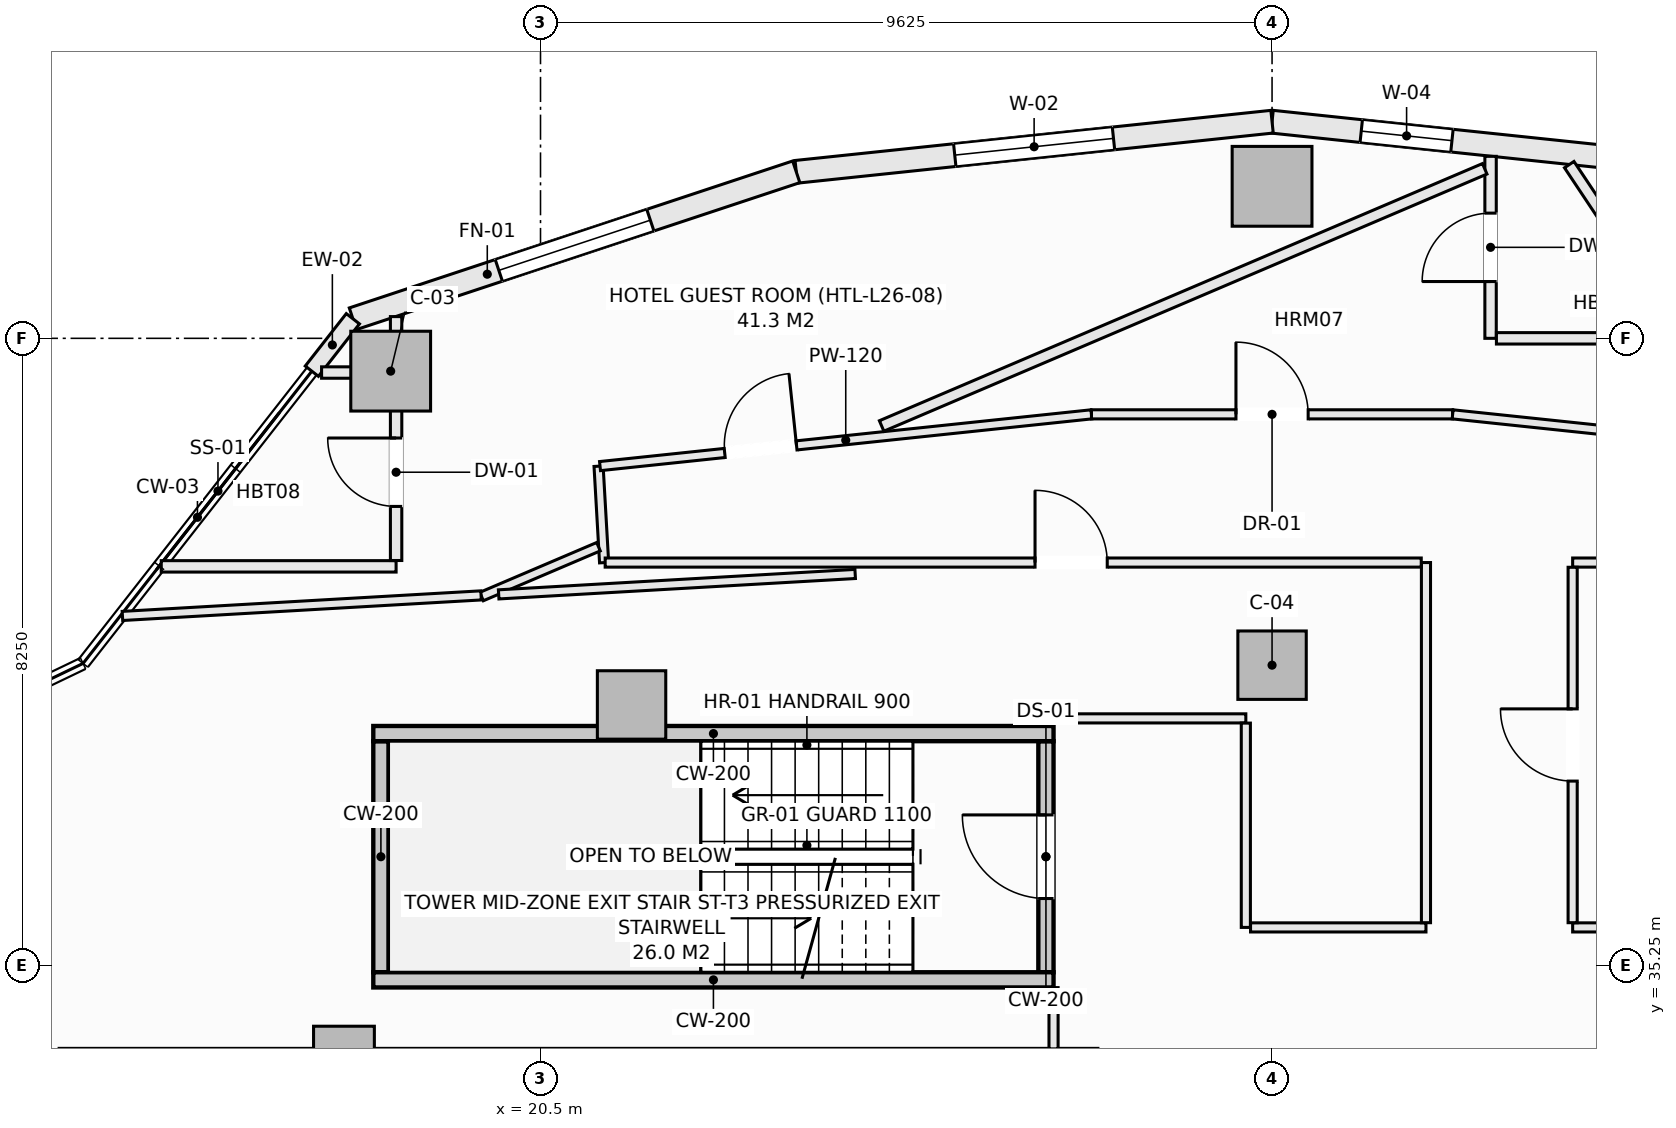
"""IFC4 building model, lengths in metres.
Left out: names, types, materials, properties, quantities, classifications, styles, units other than length and angle.
Written with IfcOpenShell. Run it as: python <this file> out.ifc"""

import sys

from ifc_helpers import new_model, si_unit, direction, frame, frame_2d, origin, origin_2d, place, context, subcontext, project, spatial, rectangle, extrude, element, fill, save


model = new_model("IFC4")
c1 = context("Model", 3, precision=1e-05, world=origin(), true_north=direction((0.0, 1.0)))
c2 = subcontext(c1, "Body", "Model", "MODEL_VIEW")
j1 = project(units=[si_unit("LENGTHUNIT", "METRE"), si_unit("PLANEANGLEUNIT", "RADIAN")], contexts=[c1])
p1 = place(None, origin())
s1 = spatial("IfcSite", under=j1, at=p1, CompositionType="ELEMENT")
p2 = place(p1, origin())
s2 = spatial("IfcBuilding", under=s1, at=p2, CompositionType="ELEMENT")
p3 = place(p2, frame((0.0, 0.0, 108.7)))
s3 = spatial("IfcBuildingStorey", under=s2, at=p3, CompositionType="ELEMENT", Elevation=108.7)
for number, where, z_axis, x_axis in (
    (1, (30.125, 45.5, -0.27), (0.0, 0.0, 1.0), (1.0, 0.0, 0.0)),
    (2, (18.529, 43.068, -0.27), (0.0, 0.0, 1.0), (1.0, 0.0, 0.0)),
):
    element("IfcColumn", number, at=place(p3, frame(where, z_axis=z_axis, x_axis=x_axis)), inside=s3, PredefinedType="COLUMN", context=c2, shape_type="SweptSolid", body=[
        extrude(rectangle(XDim=1.05, YDim=1.05, at=origin_2d()), origin(), (0.0, 0.0, 1.0), 3.4),
    ])
for number, where, z_axis, x_axis in (
    (3, (30.125, 39.2, -0.27), (0.0, 0.0, 1.0), (1.0, 0.0, 0.0)),
    (4, (21.698, 38.677, -0.27), (0.0, 0.0, 1.0), (1.0, 0.0, 0.0)),
):
    element("IfcColumn", number, at=place(p3, frame(where, z_axis=z_axis, x_axis=x_axis)), inside=s3, PredefinedType="COLUMN", context=c2, shape_type="SweptSolid", body=[
        extrude(rectangle(XDim=0.9, YDim=0.9, at=origin_2d()), origin(), (0.0, 0.0, 1.0), 3.4),
    ])
p4 = place(p3, frame((17.914, 34.05, -0.27), z_axis=(0.0, 0.0, 1.0), x_axis=(1.0, 0.0, 0.0)))
e5 = element("IfcColumn", 5, at=p4, inside=s3, PredefinedType="PILASTER", context=c2, shape_type="SweptSolid", body=[
    extrude(rectangle(XDim=0.8, YDim=0.8, at=origin_2d()), origin(), (0.0, 0.0, 1.0), 3.4),
])
p5 = place(p3, frame((30.125, 46.35, 0.0), z_axis=(0.0, 0.0, 1.0), x_axis=(0.994498012394, -0.104755445421, 0.0)))
e6 = element("IfcWall", 6, at=p5, inside=s3, PredefinedType="SOLIDWALL", context=c2, shape_type="SweptSolid", body=[
    extrude(rectangle(XDim=6.295, YDim=0.3, at=frame_2d((3.147, 0.0))), origin(), (0.0, 0.0, 1.0), 2.653),
])
p6 = place(p5, frame((1.18, 0.0, 0.72)))
e7 = element("IfcOpeningElement", 7, at=p6, cuts=e6, PredefinedType="OPENING", context=c2, shape_type="SweptSolid", body=[
    extrude(rectangle(XDim=1.2, YDim=1.65, at=frame_2d((0.6, 0.825))), frame((0.0, 0.16, 0.0), z_axis=(0.0, -1.0, 0.0), x_axis=(1.0, 0.0, 0.0)), (0.0, 0.0, 1.0), 0.32),
])
p7 = place(p3, frame((23.865, 45.691, 0.0), z_axis=(0.0, 0.0, 1.0), x_axis=(0.994498012394, 0.104755445421, 0.0)))
e8 = element("IfcWall", 8, at=p7, inside=s3, PredefinedType="SOLIDWALL", context=c2, shape_type="SweptSolid", body=[
    extrude(rectangle(XDim=6.295, YDim=0.3, at=frame_2d((3.147, 0.0))), origin(), (0.0, 0.0, 1.0), 2.653),
])
p8 = place(p7, frame((2.097, 0.0, 0.74)))
e9 = element("IfcOpeningElement", 9, at=p8, cuts=e8, PredefinedType="OPENING", context=c2, shape_type="SweptSolid", body=[
    extrude(rectangle(XDim=2.1, YDim=1.7, at=frame_2d((1.05, 0.85))), frame((0.0, 0.16, 0.0), z_axis=(0.0, -1.0, 0.0), x_axis=(1.0, 0.0, 0.0)), (0.0, 0.0, 1.0), 0.32),
])
p9 = place(p3, frame((18.031, 43.758, 0.0), z_axis=(0.0, 0.0, 1.0), x_axis=(0.949238009374, 0.314558741032, 0.0)))
e10 = element("IfcWall", 10, at=p9, inside=s3, PredefinedType="SOLIDWALL", context=c2, shape_type="SweptSolid", body=[
    extrude(rectangle(XDim=6.146, YDim=0.3, at=frame_2d((3.073, 0.0))), origin(), (0.0, 0.0, 1.0), 2.653),
])
p10 = place(p9, frame((2.023, 0.0, 0.74)))
e11 = element("IfcOpeningElement", 11, at=p10, cuts=e10, PredefinedType="OPENING", context=c2, shape_type="SweptSolid", body=[
    extrude(rectangle(XDim=2.1, YDim=1.7, at=frame_2d((1.05, 0.85))), frame((0.0, 0.16, 0.0), z_axis=(0.0, -1.0, 0.0), x_axis=(1.0, 0.0, 0.0)), (0.0, 0.0, 1.0), 0.32),
])
p11 = place(p3, frame((17.491, 43.068, 0.0), z_axis=(0.0, 0.0, 1.0), x_axis=(0.616330810297, 0.787487353726, 0.0)))
e12 = element("IfcWall", 12, at=p11, inside=s3, PredefinedType="SOLIDWALL", context=c2, shape_type="SweptSolid", body=[
    extrude(rectangle(XDim=0.876, YDim=0.22, at=frame_2d((0.438, 0.0))), origin(), (0.0, 0.0, 1.0), 2.653),
])
p12 = place(p3, frame((27.15, 35.16, -0.27), z_axis=(0.0, 0.0, 1.0), x_axis=(0.0, 1.0, 0.0)))
e13 = element("IfcWall", 13, at=p12, inside=s3, PredefinedType="SHEAR", context=c2, shape_type="SweptSolid", body=[
    extrude(rectangle(XDim=3.04, YDim=0.2, at=frame_2d((1.52, 0.0))), origin(), (0.0, 0.0, 1.0), 3.4),
])
p13 = place(p12, frame((0.97, 0.0, 0.27)))
e14 = element("IfcOpeningElement", 14, at=p13, cuts=e13, PredefinedType="OPENING", context=c2, shape_type="SweptSolid", body=[
    extrude(rectangle(XDim=1.1, YDim=2.15, at=frame_2d((0.55, 1.075))), frame((0.0, 0.11, 0.0), z_axis=(0.0, -1.0, 0.0), x_axis=(1.0, 0.0, 0.0)), (0.0, 0.0, 1.0), 0.22),
])
p14 = place(p3, frame((18.4, 35.16, -0.27), z_axis=(0.0, 0.0, 1.0), x_axis=(0.0, 1.0, 0.0)))
e15 = element("IfcWall", 15, at=p14, inside=s3, PredefinedType="SHEAR", context=c2, shape_type="SweptSolid", body=[
    extrude(rectangle(XDim=3.04, YDim=0.2, at=frame_2d((1.52, 0.0))), origin(), (0.0, 0.0, 1.0), 3.4),
])
for number, where, z_axis, x_axis in (
    (16, (18.3, 38.3, -0.27), (0.0, 0.0, 1.0), (1.0, 0.0, 0.0)),
    (17, (18.3, 35.06, -0.27), (0.0, 0.0, 1.0), (1.0, 0.0, 0.0)),
):
    element("IfcWall", number, at=place(p3, frame(where, z_axis=z_axis, x_axis=x_axis)), inside=s3, PredefinedType="SHEAR", context=c2, shape_type="SweptSolid", body=[
        extrude(rectangle(XDim=8.95, YDim=0.2, at=frame_2d((4.475, 0.0))), origin(), (0.0, 0.0, 1.0), 3.4),
    ])
p15 = place(p3, frame((21.264, 41.818, 0.0), z_axis=(0.0, 0.0, 1.0), x_axis=(0.0574492264, -0.99834842935, 0.0)))
e18 = element("IfcWall", 18, at=p15, inside=s3, PredefinedType="PARTITIONING", context=c2, shape_type="SweptSolid", body=[
    extrude(rectangle(XDim=1.271, YDim=0.12, at=frame_2d((0.635, 0.0))), origin(), (0.0, 0.0, 1.0), 3.13),
])
p16 = place(p3, frame((27.25, 34.152, 0.0), z_axis=(0.0, 0.0, 1.0), x_axis=(0.0, 1.0, 0.0)))
e19 = element("IfcWall", 19, at=p16, inside=s3, PredefinedType="PARTITIONING", context=c2, shape_type="SweptSolid", body=[
    extrude(rectangle(XDim=0.806, YDim=0.12, at=frame_2d((0.403, 0.0))), origin(), (0.0, 0.0, 1.0), 3.13),
])
p17 = place(p3, frame((27.25, 38.5, 0.0), z_axis=(0.0, 0.0, 1.0), x_axis=(1.0, 0.0, 0.0)))
e20 = element("IfcWall", 20, at=p17, inside=s3, PredefinedType="PARTITIONING", context=c2, shape_type="SweptSolid", body=[
    extrude(rectangle(XDim=2.53, YDim=0.12, at=frame_2d((1.265, 0.0))), origin(), (0.0, 0.0, 1.0), 3.13),
])
p18 = place(p3, frame((29.78, 35.75, 0.0), z_axis=(0.0, 0.0, 1.0), x_axis=(0.0, 1.0, 0.0)))
e21 = element("IfcWall", 21, at=p18, inside=s3, PredefinedType="PARTITIONING", context=c2, shape_type="SweptSolid", body=[
    extrude(rectangle(XDim=2.688, YDim=0.12, at=frame_2d((1.344, 0.0))), origin(), (0.0, 0.0, 1.0), 3.13),
])
p19 = place(p3, frame((29.842, 35.75, 0.0), z_axis=(0.0, 0.0, 1.0), x_axis=(1.0, 0.0, 0.0)))
e22 = element("IfcWall", 22, at=p19, inside=s3, PredefinedType="PARTITIONING", context=c2, shape_type="SweptSolid", body=[
    extrude(rectangle(XDim=2.308, YDim=0.12, at=frame_2d((1.154, 0.0))), origin(), (0.0, 0.0, 1.0), 3.13),
])
p20 = place(p3, frame((34.08, 35.75, 0.0), z_axis=(0.0, 0.0, 1.0), x_axis=(1.0, 0.0, 0.0)))
e23 = element("IfcWall", 23, at=p20, inside=s3, PredefinedType="PARTITIONING", context=c2, shape_type="SweptSolid", body=[
    extrude(rectangle(XDim=4.878, YDim=0.12, at=frame_2d((2.439, 0.0))), origin(), (0.0, 0.0, 1.0), 2.505),
])
p21 = place(p3, frame((32.15, 35.812, 0.0), z_axis=(0.0, 0.0, 1.0), x_axis=(0.0, 1.0, 0.0)))
e24 = element("IfcWall", 24, at=p21, inside=s3, PredefinedType="PARTITIONING", context=c2, shape_type="SweptSolid", body=[
    extrude(rectangle(XDim=4.738, YDim=0.12, at=frame_2d((2.369, 0.0))), origin(), (0.0, 0.0, 1.0), 3.13),
])
p22 = place(p3, frame((21.351, 40.55, 0.0), z_axis=(0.0, 0.0, 1.0), x_axis=(1.0, 0.0, 0.0)))
e25 = element("IfcWall", 25, at=p22, inside=s3, PredefinedType="PARTITIONING", context=c2, shape_type="SweptSolid", body=[
    extrude(rectangle(XDim=10.737, YDim=0.12, at=frame_2d((5.369, 0.0))), origin(), (0.0, 0.0, 1.0), 3.13),
])
p23 = place(p22, frame((5.656, 0.0, 0.0)))
e26 = element("IfcOpeningElement", 26, at=p23, cuts=e25, PredefinedType="OPENING", context=c2, shape_type="SweptSolid", body=[
    extrude(rectangle(XDim=0.95, YDim=2.1, at=frame_2d((0.475, 1.05))), frame((0.0, 0.07, 0.0), z_axis=(0.0, -1.0, 0.0), x_axis=(1.0, 0.0, 0.0)), (0.0, 0.0, 1.0), 0.14),
])
p24 = place(p3, frame((34.08, 40.55, 0.0), z_axis=(0.0, 0.0, 1.0), x_axis=(1.0, 0.0, 0.0)))
e27 = element("IfcWall", 27, at=p24, inside=s3, PredefinedType="PARTITIONING", context=c2, shape_type="SweptSolid", body=[
    extrude(rectangle(XDim=4.82, YDim=0.12, at=frame_2d((2.41, 0.0))), origin(), (0.0, 0.0, 1.0), 3.13),
])
p25 = place(p3, frame((21.283, 41.819, 0.0), z_axis=(0.0, 0.0, 1.0), x_axis=(0.994501131299, 0.104725831799, 0.0)))
e28 = element("IfcWall", 28, at=p25, inside=s3, PredefinedType="PARTITIONING", context=c2, shape_type="SweptSolid", body=[
    extrude(rectangle(XDim=6.502, YDim=0.12, at=frame_2d((3.251, 0.0))), origin(), (0.0, 0.0, 1.0), 3.13),
])
p26 = place(p25, frame((1.649, 0.0, 0.0)))
e29 = element("IfcOpeningElement", 29, at=p26, cuts=e28, PredefinedType="OPENING", context=c2, shape_type="SweptSolid", body=[
    extrude(rectangle(XDim=0.95, YDim=2.1, at=frame_2d((0.475, 1.05))), frame((0.0, 0.07, 0.0), z_axis=(0.0, -1.0, 0.0), x_axis=(1.0, 0.0, 0.0)), (0.0, 0.0, 1.0), 0.14),
])
p27 = place(p3, frame((27.749, 42.5, 0.0), z_axis=(0.0, 0.0, 1.0), x_axis=(1.0, 0.0, 0.0)))
e30 = element("IfcWall", 30, at=p27, inside=s3, PredefinedType="PARTITIONING", context=c2, shape_type="SweptSolid", body=[
    extrude(rectangle(XDim=4.752, YDim=0.12, at=frame_2d((2.376, 0.0))), origin(), (0.0, 0.0, 1.0), 3.13),
])
p28 = place(p27, frame((1.901, 0.0, 0.0)))
e31 = element("IfcOpeningElement", 31, at=p28, cuts=e30, PredefinedType="OPENING", context=c2, shape_type="SweptSolid", body=[
    extrude(rectangle(XDim=0.95, YDim=2.1, at=frame_2d((0.475, 1.05))), frame((0.0, 0.07, 0.0), z_axis=(0.0, -1.0, 0.0), x_axis=(1.0, 0.0, 0.0)), (0.0, 0.0, 1.0), 0.14),
])
p29 = place(p3, frame((32.501, 42.5, 0.0), z_axis=(0.0, 0.0, 1.0), x_axis=(0.994501131299, -0.104725831799, 0.0)))
e32 = element("IfcWall", 32, at=p29, inside=s3, PredefinedType="PARTITIONING", context=c2, shape_type="SweptSolid", body=[
    extrude(rectangle(XDim=6.502, YDim=0.12, at=frame_2d((3.251, 0.0))), origin(), (0.0, 0.0, 1.0), 3.13),
])
p30 = place(p29, frame((4.55, 0.0, 0.0)))
e33 = element("IfcOpeningElement", 33, at=p30, cuts=e32, PredefinedType="OPENING", context=c2, shape_type="SweptSolid", body=[
    extrude(rectangle(XDim=0.95, YDim=2.1, at=frame_2d((0.475, 1.05))), frame((0.0, 0.07, 0.0), z_axis=(0.0, -1.0, 0.0), x_axis=(1.0, 0.0, 0.0)), (0.0, 0.0, 1.0), 0.14),
])
p31 = place(p3, frame((34.08, 35.812, 0.0), z_axis=(0.0, 0.0, 1.0), x_axis=(0.0, 1.0, 0.0)))
e34 = element("IfcWall", 34, at=p31, inside=s3, PredefinedType="PARTITIONING", context=c2, shape_type="SweptSolid", body=[
    extrude(rectangle(XDim=4.676, YDim=0.12, at=frame_2d((2.338, 0.0))), origin(), (0.0, 0.0, 1.0), 2.812),
])
p32 = place(p31, frame((1.863, 0.0, 0.0)))
e35 = element("IfcOpeningElement", 35, at=p32, cuts=e34, PredefinedType="OPENING", context=c2, shape_type="SweptSolid", body=[
    extrude(rectangle(XDim=0.95, YDim=2.1, at=frame_2d((0.475, 1.05))), frame((0.0, 0.07, 0.0), z_axis=(0.0, -1.0, 0.0), x_axis=(1.0, 0.0, 0.0)), (0.0, 0.0, 1.0), 0.14),
])
p33 = place(p3, frame((34.035, 45.785, 0.0), z_axis=(0.0, 0.0, 1.0), x_axis=(0.554584277701, -0.832127561691, 0.0)))
e36 = element("IfcWall", 36, at=p33, inside=s3, PredefinedType="PARTITIONING", context=c2, shape_type="SweptSolid", body=[
    extrude(rectangle(XDim=4.375, YDim=0.15, at=frame_2d((2.187, 0.0))), origin(), (0.0, 0.0, 1.0), 3.13),
])
p34 = place(p3, frame((33.0, 43.5, 0.0), z_axis=(0.0, 0.0, 1.0), x_axis=(0.0, 1.0, 0.0)))
e37 = element("IfcWall", 37, at=p34, inside=s3, PredefinedType="PARTITIONING", context=c2, shape_type="SweptSolid", body=[
    extrude(rectangle(XDim=2.394, YDim=0.15, at=frame_2d((1.197, 0.0))), origin(), (0.0, 0.0, 1.0), 3.13),
])
p35 = place(p34, frame((0.747, 0.0, 0.0)))
e38 = element("IfcOpeningElement", 38, at=p35, cuts=e37, PredefinedType="OPENING", context=c2, shape_type="SweptSolid", body=[
    extrude(rectangle(XDim=0.9, YDim=2.1, at=frame_2d((0.45, 1.05))), frame((0.0, 0.085, 0.0), z_axis=(0.0, -1.0, 0.0), x_axis=(1.0, 0.0, 0.0)), (0.0, 0.0, 1.0), 0.17),
])
p36 = place(p3, frame((33.077, 43.5, 0.0), z_axis=(0.0, 0.0, 1.0), x_axis=(1.0, 0.0, 0.0)))
e39 = element("IfcWall", 39, at=p36, inside=s3, PredefinedType="PARTITIONING", context=c2, shape_type="SweptSolid", body=[
    extrude(rectangle(XDim=2.389, YDim=0.15, at=frame_2d((1.194, 0.0))), origin(), (0.0, 0.0, 1.0), 3.13),
])
p37 = place(p3, frame((19.725, 40.103, 0.0), z_axis=(0.0, 0.0, 1.0), x_axis=(0.919883543783, 0.392191618826, 0.0)))
e40 = element("IfcWall", 40, at=p37, inside=s3, PredefinedType="PARTITIONING", context=c2, shape_type="SweptSolid", body=[
    extrude(rectangle(XDim=1.672, YDim=0.12, at=frame_2d((0.836, 0.0))), origin(), (0.0, 0.0, 1.0), 3.13),
])
p38 = place(p3, frame((24.988, 42.347, 0.0), z_axis=(0.0, 0.0, 1.0), x_axis=(0.919871040712, 0.392220943423, 0.0)))
e41 = element("IfcWall", 41, at=p38, inside=s3, PredefinedType="PARTITIONING", context=c2, shape_type="SweptSolid", body=[
    extrude(rectangle(XDim=8.626, YDim=0.15, at=frame_2d((4.313, 0.0))), origin(), (0.0, 0.0, 1.0), 2.653),
])
p39 = place(p3, frame((15.51, 40.5, 0.0), z_axis=(0.0, 0.0, 1.0), x_axis=(1.0, 0.0, 0.0)))
e42 = element("IfcWall", 42, at=p39, inside=s3, PredefinedType="PARTITIONING", context=c2, shape_type="SweptSolid", body=[
    extrude(rectangle(XDim=3.09, YDim=0.15, at=frame_2d((1.545, 0.0))), origin(), (0.0, 0.0, 1.0), 2.653),
])
p40 = place(p3, frame((18.6, 40.577, 0.0), z_axis=(0.0, 0.0, 1.0), x_axis=(0.0, 1.0, 0.0)))
e43 = element("IfcWall", 43, at=p40, inside=s3, PredefinedType="PARTITIONING", context=c2, shape_type="SweptSolid", body=[
    extrude(rectangle(XDim=3.209, YDim=0.15, at=frame_2d((1.604, 0.0))), origin(), (0.0, 0.0, 1.0), 2.505),
])
p41 = place(p40, frame((0.711, 0.0, 0.0)))
e44 = element("IfcOpeningElement", 44, at=p41, cuts=e43, PredefinedType="OPENING", context=c2, shape_type="SweptSolid", body=[
    extrude(rectangle(XDim=0.9, YDim=2.1, at=frame_2d((0.45, 1.05))), frame((0.0, 0.085, 0.0), z_axis=(0.0, -1.0, 0.0), x_axis=(1.0, 0.0, 0.0)), (0.0, 0.0, 1.0), 0.17),
])
p42 = place(p3, frame((17.62, 43.05, 0.0), z_axis=(0.0, 0.0, 1.0), x_axis=(1.0, 0.0, 0.0)))
e45 = element("IfcWall", 45, at=p42, inside=s3, PredefinedType="PARTITIONING", context=c2, shape_type="SweptSolid", body=[
    extrude(rectangle(XDim=0.903, YDim=0.15, at=frame_2d((0.452, 0.0))), origin(), (0.0, 0.0, 1.0), 2.653),
])
p43 = place(p3, frame((15.0, 39.848, 0.0), z_axis=(0.0, 0.0, 1.0), x_axis=(0.998363675759, 0.057183659599, 0.0)))
e46 = element("IfcWall", 46, at=p43, inside=s3, PredefinedType="PARTITIONING", context=c2, shape_type="SweptSolid", body=[
    extrude(rectangle(XDim=4.726, YDim=0.12, at=frame_2d((2.363, 0.0))), origin(), (0.0, 0.0, 1.0), 3.13),
])
p44 = place(p3, frame((19.95, 40.131, 0.0), z_axis=(0.0, 0.0, 1.0), x_axis=(0.998364901087, 0.057162262711, 0.0)))
e47 = element("IfcWall", 47, at=p44, inside=s3, PredefinedType="PARTITIONING", context=c2, shape_type="SweptSolid", body=[
    extrude(rectangle(XDim=4.698, YDim=0.12, at=frame_2d((2.349, 0.0))), origin(), (0.0, 0.0, 1.0), 3.13),
])
p45 = place(p6, origin())
e48 = element("IfcWindow", 48, at=p45, inside=s3, PartitioningType="SINGLE_PANEL", PredefinedType="WINDOW", context=c2, shape_type="SweptSolid", body=[
    extrude(rectangle(XDim=1.2, YDim=1.65, at=frame_2d((0.6, 0.825))), frame((0.0, 0.03, 0.0), z_axis=(0.0, -1.0, 0.0), x_axis=(1.0, 0.0, 0.0)), (0.0, 0.0, 1.0), 0.06),
])
fill(e7, e48)
p46 = place(p8, origin())
e49 = element("IfcWindow", 49, at=p46, inside=s3, PartitioningType="SINGLE_PANEL", PredefinedType="WINDOW", context=c2, shape_type="SweptSolid", body=[
    extrude(rectangle(XDim=2.1, YDim=1.7, at=frame_2d((1.05, 0.85))), frame((0.0, 0.03, 0.0), z_axis=(0.0, -1.0, 0.0), x_axis=(1.0, 0.0, 0.0)), (0.0, 0.0, 1.0), 0.06),
])
fill(e9, e49)
p47 = place(p10, origin())
e50 = element("IfcWindow", 50, at=p47, inside=s3, PartitioningType="SINGLE_PANEL", PredefinedType="WINDOW", context=c2, shape_type="SweptSolid", body=[
    extrude(rectangle(XDim=2.1, YDim=1.7, at=frame_2d((1.05, 0.85))), frame((0.0, 0.03, 0.0), z_axis=(0.0, -1.0, 0.0), x_axis=(1.0, 0.0, 0.0)), (0.0, 0.0, 1.0), 0.06),
])
fill(e11, e50)
p48 = place(p13, origin())
e51 = element("IfcDoor", 51, at=p48, inside=s3, OperationType="SINGLE_SWING_RIGHT", PredefinedType="DOOR", context=c2, shape_type="SweptSolid", body=[
    extrude(rectangle(XDim=1.1, YDim=2.15, at=frame_2d((0.55, 1.075))), frame((0.0, 0.025, 0.0), z_axis=(0.0, -1.0, 0.0), x_axis=(1.0, 0.0, 0.0)), (0.0, 0.0, 1.0), 0.05),
])
fill(e14, e51)
p49 = place(p32, origin())
e52 = element("IfcDoor", 52, at=p49, inside=s3, OperationType="SINGLE_SWING_RIGHT", PredefinedType="DOOR", context=c2, shape_type="SweptSolid", body=[
    extrude(rectangle(XDim=0.95, YDim=2.1, at=frame_2d((0.475, 1.05))), frame((0.0, 0.025, 0.0), z_axis=(0.0, -1.0, 0.0), x_axis=(1.0, 0.0, 0.0)), (0.0, 0.0, 1.0), 0.05),
])
fill(e35, e52)
p50 = place(p28, origin())
e53 = element("IfcDoor", 53, at=p50, inside=s3, OperationType="SINGLE_SWING_LEFT", PredefinedType="DOOR", context=c2, shape_type="SweptSolid", body=[
    extrude(rectangle(XDim=0.95, YDim=2.1, at=frame_2d((0.475, 1.05))), frame((0.0, 0.025, 0.0), z_axis=(0.0, -1.0, 0.0), x_axis=(1.0, 0.0, 0.0)), (0.0, 0.0, 1.0), 0.05),
])
fill(e31, e53)
p51 = place(p26, origin())
e54 = element("IfcDoor", 54, at=p51, inside=s3, OperationType="SINGLE_SWING_RIGHT", PredefinedType="DOOR", context=c2, shape_type="SweptSolid", body=[
    extrude(rectangle(XDim=0.95, YDim=2.1, at=frame_2d((0.475, 1.05))), frame((0.0, 0.025, 0.0), z_axis=(0.0, -1.0, 0.0), x_axis=(1.0, 0.0, 0.0)), (0.0, 0.0, 1.0), 0.05),
])
fill(e29, e54)
p52 = place(p23, origin())
e55 = element("IfcDoor", 55, at=p52, inside=s3, OperationType="SINGLE_SWING_LEFT", PredefinedType="DOOR", context=c2, shape_type="SweptSolid", body=[
    extrude(rectangle(XDim=0.95, YDim=2.1, at=frame_2d((0.475, 1.05))), frame((0.0, 0.025, 0.0), z_axis=(0.0, -1.0, 0.0), x_axis=(1.0, 0.0, 0.0)), (0.0, 0.0, 1.0), 0.05),
])
fill(e26, e55)
p53 = place(p35, origin())
e56 = element("IfcDoor", 56, at=p53, inside=s3, OperationType="SINGLE_SWING_LEFT", PredefinedType="DOOR", context=c2, shape_type="SweptSolid", body=[
    extrude(rectangle(XDim=0.9, YDim=2.1, at=frame_2d((0.45, 1.05))), frame((0.0, 0.025, 0.0), z_axis=(0.0, -1.0, 0.0), x_axis=(1.0, 0.0, 0.0)), (0.0, 0.0, 1.0), 0.05),
])
fill(e38, e56)
p54 = place(p41, origin())
e57 = element("IfcDoor", 57, at=p54, inside=s3, OperationType="SINGLE_SWING_RIGHT", PredefinedType="DOOR", context=c2, shape_type="SweptSolid", body=[
    extrude(rectangle(XDim=0.9, YDim=2.1, at=frame_2d((0.45, 1.05))), frame((0.0, 0.025, 0.0), z_axis=(0.0, -1.0, 0.0), x_axis=(1.0, 0.0, 0.0)), (0.0, 0.0, 1.0), 0.05),
])
fill(e44, e57)
save(model, sys.argv[1])
